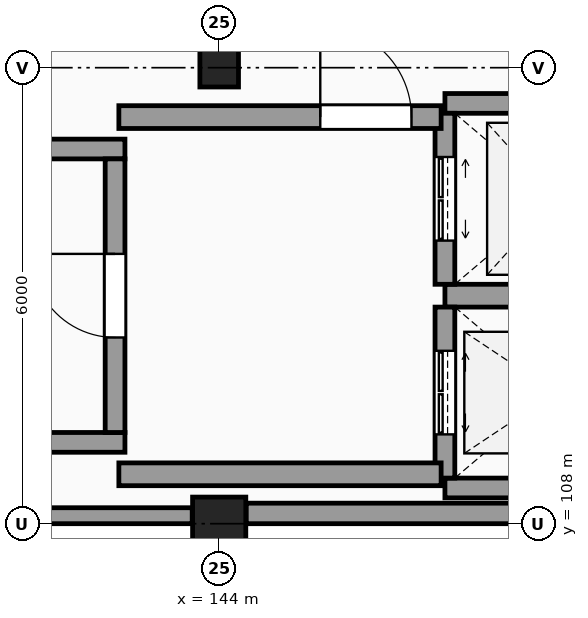
"""IFC4 building model, lengths in metres.
Left out: names, types, materials, properties, quantities, classifications, styles, units other than length and angle.
Written with IfcOpenShell. Run it as: python <this file> out.ifc"""

import sys

from ifc_helpers import new_model, si_unit, direction, frame, frame_2d, origin, origin_2d, place, context, subcontext, project, spatial, rectangle, circle, hollow_circle, extrude, element, fill, save


model = new_model("IFC4")
c1 = context("Model", 3, precision=1e-05, world=origin(), true_north=direction((0.0, 1.0)))
c2 = subcontext(c1, "Body", "Model", "MODEL_VIEW")
j1 = project(units=[si_unit("LENGTHUNIT", "METRE"), si_unit("PLANEANGLEUNIT", "RADIAN")], contexts=[c1])
p1 = place(None, origin())
s1 = spatial("IfcSite", under=j1, at=p1, CompositionType="ELEMENT")
p2 = place(p1, origin())
s2 = spatial("IfcBuilding", under=s1, at=p2, CompositionType="ELEMENT")
p3 = place(p2, frame((0.0, 0.0, 15.0)))
s3 = spatial("IfcBuildingStorey", under=s2, at=p3, CompositionType="ELEMENT", Elevation=15.0)
p4 = place(p3, frame((144.0, 108.0, 0.0), z_axis=(0.0, 0.0, 1.0), x_axis=(1.0, 0.0, 0.0)))
e1 = element("IfcColumn", 1, at=p4, inside=s3, PredefinedType="COLUMN", context=c2, shape_type="SweptSolid", body=[
    extrude(circle(Radius=0.35, at=origin_2d()), origin(), (0.0, 0.0, 1.0), 4.8),
])
p5 = place(p3, frame((144.0, 114.0, 0.0), z_axis=(0.0, 0.0, 1.0), x_axis=(1.0, 0.0, 0.0)))
e2 = element("IfcColumn", 2, at=p5, inside=s3, PredefinedType="COLUMN", context=c2, shape_type="SweptSolid", body=[
    extrude(hollow_circle(Radius=0.254, WallThickness=0.025, at=origin_2d()), origin(), (0.0, 0.0, 1.0), 4.8),
])
p6 = place(p3, frame((138.33, 108.105, 0.0), z_axis=(0.0, 0.0, 1.0), x_axis=(1.0, 0.0, 0.0)))
e3 = element("IfcWall", 3, at=p6, inside=s3, PredefinedType="SOLIDWALL", context=c2, shape_type="SweptSolid", body=[
    extrude(rectangle(XDim=5.315, YDim=0.21, at=frame_2d((2.657, 0.0))), origin(), (0.0, 0.0, 1.0), 3.7),
])
p7 = place(p3, frame((144.355, 108.135, 0.0), z_axis=(0.0, 0.0, 1.0), x_axis=(1.0, 0.0, 0.0)))
e4 = element("IfcWall", 4, at=p7, inside=s3, PredefinedType="SOLIDWALL", context=c2, shape_type="SweptSolid", body=[
    extrude(rectangle(XDim=5.386, YDim=0.27, at=frame_2d((2.693, 0.0))), origin(), (0.0, 0.0, 1.0), 3.7),
])
for number, where, z_axis, x_axis in (
    (5, (132.04, 109.07, 0.0), (0.0, 0.0, 1.0), (1.0, 0.0, 0.0)),
    (6, (132.04, 112.93, 0.0), (0.0, 0.0, 1.0), (1.0, 0.0, 0.0)),
):
    element("IfcWall", number, at=place(p3, frame(where, z_axis=z_axis, x_axis=x_axis)), inside=s3, PredefinedType="SHEAR", context=c2, shape_type="SweptSolid", body=[
        extrude(rectangle(XDim=10.72, YDim=0.26, at=frame_2d((5.36, 0.0))), origin(), (0.0, 0.0, 1.0), 4.8),
    ])
p8 = place(p3, frame((142.63, 109.2, 0.0), z_axis=(0.0, 0.0, 1.0), x_axis=(0.0, 1.0, 0.0)))
e7 = element("IfcWall", 7, at=p8, inside=s3, PredefinedType="SHEAR", context=c2, shape_type="SweptSolid", body=[
    extrude(rectangle(XDim=3.6, YDim=0.26, at=frame_2d((1.8, 0.0))), origin(), (0.0, 0.0, 1.0), 4.8),
])
p9 = place(p8, frame((1.25, 0.0, 0.0)))
e8 = element("IfcOpeningElement", 8, at=p9, cuts=e7, PredefinedType="OPENING", context=c2, shape_type="SweptSolid", body=[
    extrude(rectangle(XDim=1.1, YDim=2.15, at=frame_2d((0.55, 1.075))), frame((0.0, 0.14, 0.0), z_axis=(0.0, -1.0, 0.0), x_axis=(1.0, 0.0, 0.0)), (0.0, 0.0, 1.0), 0.28),
])
p10 = place(p3, frame((146.97, 108.47, 0.0), z_axis=(0.0, 0.0, 1.0), x_axis=(1.0, 0.0, 0.0)))
e9 = element("IfcWall", 9, at=p10, inside=s3, PredefinedType="SHEAR", context=c2, shape_type="SweptSolid", body=[
    extrude(rectangle(XDim=2.91, YDim=0.26, at=frame_2d((1.455, 0.0))), origin(), (0.0, 0.0, 1.0), 4.8),
])
p11 = place(p3, frame((146.97, 111.0, 0.0), z_axis=(0.0, 0.0, 1.0), x_axis=(1.0, 0.0, 0.0)))
e10 = element("IfcWall", 10, at=p11, inside=s3, PredefinedType="SHEAR", context=c2, shape_type="SweptSolid", body=[
    extrude(rectangle(XDim=2.91, YDim=0.3, at=frame_2d((1.455, 0.0))), origin(), (0.0, 0.0, 1.0), 4.8),
])
p12 = place(p3, frame((146.97, 108.6, 0.0), z_axis=(0.0, 0.0, 1.0), x_axis=(0.0, 1.0, 0.0)))
e11 = element("IfcWall", 11, at=p12, inside=s3, PredefinedType="SHEAR", context=c2, shape_type="SweptSolid", body=[
    extrude(rectangle(XDim=2.25, YDim=0.26, at=frame_2d((1.125, 0.0))), origin(), (0.0, 0.0, 1.0), 4.8),
])
p13 = place(p12, frame((0.575, 0.0, 0.0)))
e12 = element("IfcOpeningElement", 12, at=p13, cuts=e11, PredefinedType="OPENING", context=c2, shape_type="SweptSolid", body=[
    extrude(rectangle(XDim=1.1, YDim=2.2, at=frame_2d((0.55, 1.1))), frame((0.0, 0.14, 0.0), z_axis=(0.0, -1.0, 0.0), x_axis=(1.0, 0.0, 0.0)), (0.0, 0.0, 1.0), 0.28),
])
p14 = place(p3, frame((146.97, 113.53, 0.0), z_axis=(0.0, 0.0, 1.0), x_axis=(1.0, 0.0, 0.0)))
e13 = element("IfcWall", 13, at=p14, inside=s3, PredefinedType="SHEAR", context=c2, shape_type="SweptSolid", body=[
    extrude(rectangle(XDim=2.91, YDim=0.26, at=frame_2d((1.455, 0.0))), origin(), (0.0, 0.0, 1.0), 4.8),
])
p15 = place(p3, frame((146.97, 111.15, 0.0), z_axis=(0.0, 0.0, 1.0), x_axis=(0.0, 1.0, 0.0)))
e14 = element("IfcWall", 14, at=p15, inside=s3, PredefinedType="SHEAR", context=c2, shape_type="SweptSolid", body=[
    extrude(rectangle(XDim=2.25, YDim=0.26, at=frame_2d((1.125, 0.0))), origin(), (0.0, 0.0, 1.0), 4.8),
])
p16 = place(p15, frame((0.575, 0.0, 0.0)))
e15 = element("IfcOpeningElement", 15, at=p16, cuts=e14, PredefinedType="OPENING", context=c2, shape_type="SweptSolid", body=[
    extrude(rectangle(XDim=1.1, YDim=2.2, at=frame_2d((0.55, 1.1))), frame((0.0, 0.14, 0.0), z_axis=(0.0, -1.0, 0.0), x_axis=(1.0, 0.0, 0.0)), (0.0, 0.0, 1.0), 0.28),
])
p17 = place(p3, frame((142.68, 113.35, 0.0), z_axis=(0.0, 0.0, 1.0), x_axis=(1.0, 0.0, 0.0)))
e16 = element("IfcWall", 16, at=p17, inside=s3, PredefinedType="SHEAR", context=c2, shape_type="SweptSolid", body=[
    extrude(rectangle(XDim=4.24, YDim=0.3, at=frame_2d((2.12, 0.0))), origin(), (0.0, 0.0, 1.0), 4.8),
])
p18 = place(p17, frame((2.65, 0.0, 0.0)))
e17 = element("IfcOpeningElement", 17, at=p18, cuts=e16, PredefinedType="OPENING", context=c2, shape_type="SweptSolid", body=[
    extrude(rectangle(XDim=1.2, YDim=2.2, at=frame_2d((0.6, 1.1))), frame((0.0, 0.16, 0.0), z_axis=(0.0, -1.0, 0.0), x_axis=(1.0, 0.0, 0.0)), (0.0, 0.0, 1.0), 0.32),
])
p19 = place(p3, frame((142.68, 108.65, 0.0), z_axis=(0.0, 0.0, 1.0), x_axis=(1.0, 0.0, 0.0)))
e18 = element("IfcWall", 18, at=p19, inside=s3, PredefinedType="SHEAR", context=c2, shape_type="SweptSolid", body=[
    extrude(rectangle(XDim=4.24, YDim=0.3, at=frame_2d((2.12, 0.0))), origin(), (0.0, 0.0, 1.0), 4.8),
])
p20 = place(p9, origin())
e19 = element("IfcDoor", 19, at=p20, inside=s3, OperationType="SINGLE_SWING_RIGHT", PredefinedType="DOOR", context=c2, shape_type="SweptSolid", body=[
    extrude(rectangle(XDim=1.1, YDim=2.15, at=frame_2d((0.55, 1.075))), frame((0.0, 0.025, 0.0), z_axis=(0.0, -1.0, 0.0), x_axis=(1.0, 0.0, 0.0)), (0.0, 0.0, 1.0), 0.05),
])
fill(e8, e19)
p21 = place(p13, origin())
e20 = element("IfcDoor", 20, at=p21, inside=s3, OperationType="DOUBLE_DOOR_SLIDING", PredefinedType="DOOR", context=c2, shape_type="SweptSolid", body=[
    extrude(rectangle(XDim=1.1, YDim=2.2, at=frame_2d((0.55, 1.1))), frame((0.0, 0.025, 0.0), z_axis=(0.0, -1.0, 0.0), x_axis=(1.0, 0.0, 0.0)), (0.0, 0.0, 1.0), 0.05),
])
fill(e12, e20)
p22 = place(p16, origin())
e21 = element("IfcDoor", 21, at=p22, inside=s3, OperationType="DOUBLE_DOOR_SLIDING", PredefinedType="DOOR", context=c2, shape_type="SweptSolid", body=[
    extrude(rectangle(XDim=1.1, YDim=2.2, at=frame_2d((0.55, 1.1))), frame((0.0, 0.025, 0.0), z_axis=(0.0, -1.0, 0.0), x_axis=(1.0, 0.0, 0.0)), (0.0, 0.0, 1.0), 0.05),
])
fill(e15, e21)
p23 = place(p18, origin())
e22 = element("IfcDoor", 22, at=p23, inside=s3, OperationType="SINGLE_SWING_LEFT", PredefinedType="DOOR", context=c2, shape_type="SweptSolid", body=[
    extrude(rectangle(XDim=1.2, YDim=2.2, at=frame_2d((0.6, 1.1))), frame((0.0, 0.025, 0.0), z_axis=(0.0, -1.0, 0.0), x_axis=(1.0, 0.0, 0.0)), (0.0, 0.0, 1.0), 0.05),
])
fill(e17, e22)
save(model, sys.argv[1])
